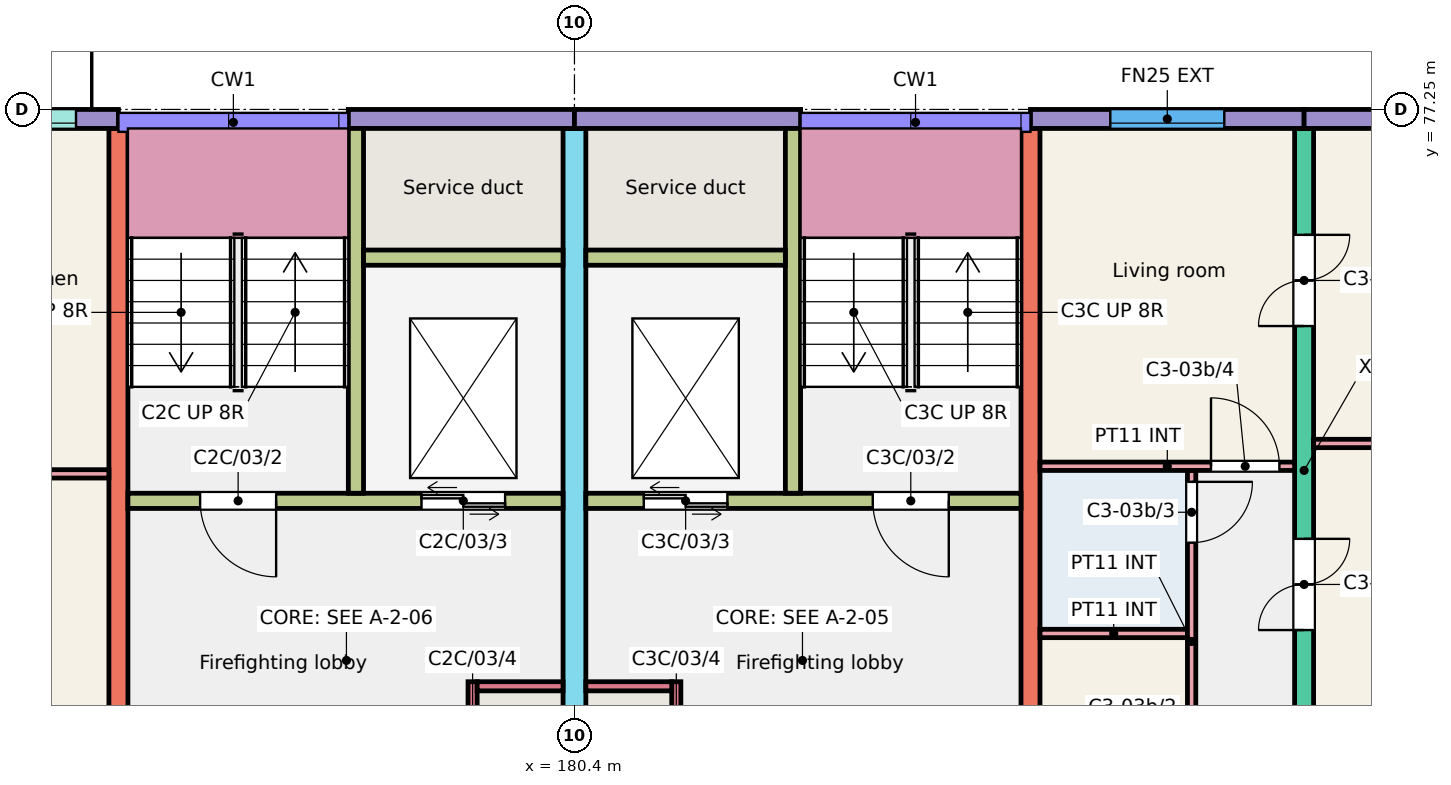
"""IFC4 building model, lengths in metres.
Left out: names, types, materials, properties, quantities, classifications, styles, units other than length and angle.
Written with IfcOpenShell. Run it as: python <this file> out.ifc"""

import sys

from ifc_helpers import new_model, si_unit, direction, frame, frame_2d, origin, place, context, subcontext, project, spatial, rectangle, extrude, element, fill, save


model = new_model("IFC4")
c1 = context("Model", 3, precision=1e-05, world=origin(), true_north=direction((0.0, 1.0)))
c2 = subcontext(c1, "Body", "Model", "MODEL_VIEW")
j1 = project(units=[si_unit("LENGTHUNIT", "METRE"), si_unit("PLANEANGLEUNIT", "RADIAN")], contexts=[c1])
p1 = place(None, origin())
s1 = spatial("IfcSite", under=j1, at=p1, CompositionType="ELEMENT")
p2 = place(p1, origin())
s2 = spatial("IfcBuilding", under=s1, at=p2, CompositionType="ELEMENT")
p3 = place(p2, frame((0.0, 0.0, 9.0)))
s3 = spatial("IfcBuildingStorey", under=s2, at=p3, CompositionType="ELEMENT", Elevation=9.0)
p4 = place(p3, frame((174.4, 68.0, 0.0), z_axis=(0.0, 0.0, 1.0), x_axis=(0.0, 1.0, 0.0)))
e1 = element("IfcWall", 1, at=p4, inside=s3, PredefinedType="SHEAR", context=c2, shape_type="SweptSolid", body=[
    extrude(rectangle(XDim=9.0, YDim=0.25, at=frame_2d((4.5, 0.0))), origin(), (0.0, 0.0, 1.0), 3.0),
])
p5 = place(p3, frame((180.4, 66.0, 0.0), z_axis=(0.0, 0.0, 1.0), x_axis=(0.0, 1.0, 0.0)))
e2 = element("IfcWall", 2, at=p5, inside=s3, PredefinedType="SHEAR", context=c2, shape_type="SweptSolid", body=[
    extrude(rectangle(XDim=11.0, YDim=0.3, at=frame_2d((5.5, 0.0))), origin(), (0.0, 0.0, 1.0), 3.0),
])
p6 = place(p5, frame((0.3, 0.0, 0.0)))
e3 = element("IfcOpeningElement", 3, at=p6, cuts=e2, PredefinedType="OPENING", context=c2, shape_type="SweptSolid", body=[
    extrude(rectangle(XDim=1.2, YDim=2.1, at=frame_2d((0.6, 1.05))), frame((0.0, 0.16, 0.0), z_axis=(0.0, -1.0, 0.0), x_axis=(1.0, 0.0, 0.0)), (0.0, 0.0, 1.0), 0.32),
])
p7 = place(p3, frame((186.4, 68.0, 0.0), z_axis=(0.0, 0.0, 1.0), x_axis=(0.0, 1.0, 0.0)))
e4 = element("IfcWall", 4, at=p7, inside=s3, PredefinedType="SHEAR", context=c2, shape_type="SweptSolid", body=[
    extrude(rectangle(XDim=9.0, YDim=0.25, at=frame_2d((4.5, 0.0))), origin(), (0.0, 0.0, 1.0), 3.0),
])
p8 = place(p3, frame((190.0, 68.0, 0.0), z_axis=(0.0, 0.0, 1.0), x_axis=(0.0, 1.0, 0.0)))
e5 = element("IfcWall", 5, at=p8, inside=s3, PredefinedType="SHEAR", context=c2, shape_type="SweptSolid", body=[
    extrude(rectangle(XDim=9.0, YDim=0.25, at=frame_2d((4.5, 0.0))), origin(), (0.0, 0.0, 1.0), 3.0),
])
p9 = place(p8, frame((2.4, 0.0, 0.0)))
e6 = element("IfcOpeningElement", 6, at=p9, cuts=e5, PredefinedType="OPENING", context=c2, shape_type="SweptSolid", body=[
    extrude(rectangle(XDim=1.2, YDim=2.1, at=frame_2d((0.6, 1.05))), frame((0.0, 0.135, 0.0), z_axis=(0.0, -1.0, 0.0), x_axis=(1.0, 0.0, 0.0)), (0.0, 0.0, 1.0), 0.27),
])
p10 = place(p8, frame((6.4, 0.0, 0.0)))
e7 = element("IfcOpeningElement", 7, at=p10, cuts=e5, PredefinedType="OPENING", context=c2, shape_type="SweptSolid", body=[
    extrude(rectangle(XDim=1.2, YDim=2.1, at=frame_2d((0.6, 1.05))), frame((0.0, 0.135, 0.0), z_axis=(0.0, -1.0, 0.0), x_axis=(1.0, 0.0, 0.0)), (0.0, 0.0, 1.0), 0.27),
])
p11 = place(p3, frame((170.8, 77.125, 0.0), z_axis=(0.0, 0.0, 1.0), x_axis=(1.0, 0.0, 0.0)))
e8 = element("IfcWall", 8, at=p11, inside=s3, PredefinedType="SOLIDWALL", context=c2, shape_type="SweptSolid", body=[
    extrude(rectangle(XDim=3.6, YDim=0.25, at=frame_2d((1.8, 0.0))), origin(), (0.0, 0.0, 1.0), 3.0),
])
p12 = place(p11, frame((1.842, 0.0, 1.1)))
e9 = element("IfcOpeningElement", 9, at=p12, cuts=e8, PredefinedType="OPENING", context=c2, shape_type="SweptSolid", body=[
    extrude(rectangle(XDim=1.2, YDim=1.3, at=frame_2d((0.6, 0.65))), frame((0.0, 0.135, 0.0), z_axis=(0.0, -1.0, 0.0), x_axis=(1.0, 0.0, 0.0)), (0.0, 0.0, 1.0), 0.27),
])
p13 = place(p11, frame((0.309, 0.0, 0.0)))
e10 = element("IfcOpeningElement", 10, at=p13, cuts=e8, PredefinedType="OPENING", context=c2, shape_type="SweptSolid", body=[
    extrude(rectangle(XDim=1.0, YDim=2.1, at=frame_2d((0.5, 1.05))), frame((0.0, 0.135, 0.0), z_axis=(0.0, -1.0, 0.0), x_axis=(1.0, 0.0, 0.0)), (0.0, 0.0, 1.0), 0.27),
])
p14 = place(p3, frame((177.425, 77.125, 0.0), z_axis=(0.0, 0.0, 1.0), x_axis=(1.0, 0.0, 0.0)))
e11 = element("IfcWall", 11, at=p14, inside=s3, PredefinedType="SOLIDWALL", context=c2, shape_type="SweptSolid", body=[
    extrude(rectangle(XDim=2.975, YDim=0.25, at=frame_2d((1.487, 0.0))), origin(), (0.0, 0.0, 1.0), 3.0),
])
p15 = place(p3, frame((174.525, 72.1, 0.0), z_axis=(0.0, 0.0, 1.0), x_axis=(1.0, 0.0, 0.0)))
e12 = element("IfcWall", 12, at=p15, inside=s3, PredefinedType="SHEAR", context=c2, shape_type="SweptSolid", body=[
    extrude(rectangle(XDim=5.725, YDim=0.2, at=frame_2d((2.863, 0.0))), origin(), (0.0, 0.0, 1.0), 3.0),
])
p16 = place(p15, frame((0.95, 0.0, 0.0)))
e13 = element("IfcOpeningElement", 13, at=p16, cuts=e12, PredefinedType="OPENING", context=c2, shape_type="SweptSolid", body=[
    extrude(rectangle(XDim=1.0, YDim=2.1, at=frame_2d((0.5, 1.05))), frame((0.0, 0.11, 0.0), z_axis=(0.0, -1.0, 0.0), x_axis=(1.0, 0.0, 0.0)), (0.0, 0.0, 1.0), 0.22),
])
p17 = place(p15, frame((3.863, 0.0, 0.0)))
e14 = element("IfcOpeningElement", 14, at=p17, cuts=e12, PredefinedType="OPENING", context=c2, shape_type="SweptSolid", body=[
    extrude(rectangle(XDim=1.1, YDim=2.1, at=frame_2d((0.55, 1.05))), frame((0.0, 0.11, 0.0), z_axis=(0.0, -1.0, 0.0), x_axis=(1.0, 0.0, 0.0)), (0.0, 0.0, 1.0), 0.22),
])
p18 = place(p3, frame((177.525, 72.2, 0.0), z_axis=(0.0, 0.0, 1.0), x_axis=(0.0, 1.0, 0.0)))
e15 = element("IfcWall", 15, at=p18, inside=s3, PredefinedType="SHEAR", context=c2, shape_type="SweptSolid", body=[
    extrude(rectangle(XDim=4.8, YDim=0.2, at=frame_2d((2.4, 0.0))), origin(), (0.0, 0.0, 1.0), 3.0),
])
p19 = place(p3, frame((177.625, 75.3, 0.0), z_axis=(0.0, 0.0, 1.0), x_axis=(1.0, 0.0, 0.0)))
e16 = element("IfcWall", 16, at=p19, inside=s3, PredefinedType="SHEAR", context=c2, shape_type="SweptSolid", body=[
    extrude(rectangle(XDim=2.625, YDim=0.2, at=frame_2d((1.312, 0.0))), origin(), (0.0, 0.0, 1.0), 3.0),
])
p20 = place(p3, frame((179.06, 68.0, 0.0), z_axis=(0.0, 0.0, 1.0), x_axis=(0.0, 1.0, 0.0)))
e17 = element("IfcWall", 17, at=p20, inside=s3, PredefinedType="SHEAR", context=c2, shape_type="SweptSolid", body=[
    extrude(rectangle(XDim=1.72, YDim=0.12, at=frame_2d((0.86, 0.0))), origin(), (0.0, 0.0, 1.0), 3.0),
])
p21 = place(p20, frame((0.45, 0.0, 0.0)))
e18 = element("IfcOpeningElement", 18, at=p21, cuts=e17, PredefinedType="OPENING", context=c2, shape_type="SweptSolid", body=[
    extrude(rectangle(XDim=0.9, YDim=2.1, at=frame_2d((0.45, 1.05))), frame((0.0, 0.07, 0.0), z_axis=(0.0, -1.0, 0.0), x_axis=(1.0, 0.0, 0.0)), (0.0, 0.0, 1.0), 0.14),
])
p22 = place(p3, frame((179.12, 69.66, 0.0), z_axis=(0.0, 0.0, 1.0), x_axis=(1.0, 0.0, 0.0)))
e19 = element("IfcWall", 19, at=p22, inside=s3, PredefinedType="SHEAR", context=c2, shape_type="SweptSolid", body=[
    extrude(rectangle(XDim=1.13, YDim=0.12, at=frame_2d((0.565, 0.0))), origin(), (0.0, 0.0, 1.0), 3.0),
])
p23 = place(p3, frame((180.4, 77.125, 0.0), z_axis=(0.0, 0.0, 1.0), x_axis=(1.0, 0.0, 0.0)))
e20 = element("IfcWall", 20, at=p23, inside=s3, PredefinedType="SOLIDWALL", context=c2, shape_type="SweptSolid", body=[
    extrude(rectangle(XDim=2.975, YDim=0.25, at=frame_2d((1.488, 0.0))), origin(), (0.0, 0.0, 1.0), 3.0),
])
p24 = place(p3, frame((180.55, 72.1, 0.0), z_axis=(0.0, 0.0, 1.0), x_axis=(1.0, 0.0, 0.0)))
e21 = element("IfcWall", 21, at=p24, inside=s3, PredefinedType="SHEAR", context=c2, shape_type="SweptSolid", body=[
    extrude(rectangle(XDim=5.725, YDim=0.2, at=frame_2d((2.862, 0.0))), origin(), (0.0, 0.0, 1.0), 3.0),
])
p25 = place(p24, frame((3.775, 0.0, 0.0)))
e22 = element("IfcOpeningElement", 22, at=p25, cuts=e21, PredefinedType="OPENING", context=c2, shape_type="SweptSolid", body=[
    extrude(rectangle(XDim=1.0, YDim=2.1, at=frame_2d((0.5, 1.05))), frame((0.0, 0.11, 0.0), z_axis=(0.0, -1.0, 0.0), x_axis=(1.0, 0.0, 0.0)), (0.0, 0.0, 1.0), 0.22),
])
p26 = place(p24, frame((0.762, 0.0, 0.0)))
e23 = element("IfcOpeningElement", 23, at=p26, cuts=e21, PredefinedType="OPENING", context=c2, shape_type="SweptSolid", body=[
    extrude(rectangle(XDim=1.1, YDim=2.1, at=frame_2d((0.55, 1.05))), frame((0.0, 0.11, 0.0), z_axis=(0.0, -1.0, 0.0), x_axis=(1.0, 0.0, 0.0)), (0.0, 0.0, 1.0), 0.22),
])
p27 = place(p3, frame((183.275, 72.2, 0.0), z_axis=(0.0, 0.0, 1.0), x_axis=(0.0, 1.0, 0.0)))
e24 = element("IfcWall", 24, at=p27, inside=s3, PredefinedType="SHEAR", context=c2, shape_type="SweptSolid", body=[
    extrude(rectangle(XDim=4.8, YDim=0.2, at=frame_2d((2.4, 0.0))), origin(), (0.0, 0.0, 1.0), 3.0),
])
p28 = place(p3, frame((180.55, 75.3, 0.0), z_axis=(0.0, 0.0, 1.0), x_axis=(1.0, 0.0, 0.0)))
e25 = element("IfcWall", 25, at=p28, inside=s3, PredefinedType="SHEAR", context=c2, shape_type="SweptSolid", body=[
    extrude(rectangle(XDim=2.625, YDim=0.2, at=frame_2d((1.312, 0.0))), origin(), (0.0, 0.0, 1.0), 3.0),
])
p29 = place(p3, frame((181.74, 68.0, 0.0), z_axis=(0.0, 0.0, 1.0), x_axis=(0.0, 1.0, 0.0)))
e26 = element("IfcWall", 26, at=p29, inside=s3, PredefinedType="SHEAR", context=c2, shape_type="SweptSolid", body=[
    extrude(rectangle(XDim=1.72, YDim=0.12, at=frame_2d((0.86, 0.0))), origin(), (0.0, 0.0, 1.0), 3.0),
])
p30 = place(p29, frame((0.45, 0.0, 0.0)))
e27 = element("IfcOpeningElement", 27, at=p30, cuts=e26, PredefinedType="OPENING", context=c2, shape_type="SweptSolid", body=[
    extrude(rectangle(XDim=0.9, YDim=2.1, at=frame_2d((0.45, 1.05))), frame((0.0, 0.07, 0.0), z_axis=(0.0, -1.0, 0.0), x_axis=(1.0, 0.0, 0.0)), (0.0, 0.0, 1.0), 0.14),
])
p31 = place(p3, frame((180.55, 69.66, 0.0), z_axis=(0.0, 0.0, 1.0), x_axis=(1.0, 0.0, 0.0)))
e28 = element("IfcWall", 28, at=p31, inside=s3, PredefinedType="SHEAR", context=c2, shape_type="SweptSolid", body=[
    extrude(rectangle(XDim=1.13, YDim=0.12, at=frame_2d((0.565, 0.0))), origin(), (0.0, 0.0, 1.0), 3.0),
])
p32 = place(p3, frame((186.4, 77.125, 0.0), z_axis=(0.0, 0.0, 1.0), x_axis=(1.0, 0.0, 0.0)))
e29 = element("IfcWall", 29, at=p32, inside=s3, PredefinedType="SOLIDWALL", context=c2, shape_type="SweptSolid", body=[
    extrude(rectangle(XDim=3.6, YDim=0.25, at=frame_2d((1.8, 0.0))), origin(), (0.0, 0.0, 1.0), 3.0),
])
p33 = place(p32, frame((1.05, 0.0, 0.9)))
e30 = element("IfcOpeningElement", 30, at=p33, cuts=e29, PredefinedType="OPENING", context=c2, shape_type="SweptSolid", body=[
    extrude(rectangle(XDim=1.5, YDim=1.5, at=frame_2d((0.75, 0.75))), frame((0.0, 0.135, 0.0), z_axis=(0.0, -1.0, 0.0), x_axis=(1.0, 0.0, 0.0)), (0.0, 0.0, 1.0), 0.27),
])
p34 = place(p3, frame((190.0, 77.125, 0.0), z_axis=(0.0, 0.0, 1.0), x_axis=(1.0, 0.0, 0.0)))
e31 = element("IfcWall", 31, at=p34, inside=s3, PredefinedType="SOLIDWALL", context=c2, shape_type="SweptSolid", body=[
    extrude(rectangle(XDim=3.6, YDim=0.25, at=frame_2d((1.8, 0.0))), origin(), (0.0, 0.0, 1.0), 3.0),
])
p35 = place(p34, frame((1.062, 0.0, 0.9)))
e32 = element("IfcOpeningElement", 32, at=p35, cuts=e31, PredefinedType="OPENING", context=c2, shape_type="SweptSolid", body=[
    extrude(rectangle(XDim=1.5, YDim=1.5, at=frame_2d((0.75, 0.75))), frame((0.0, 0.135, 0.0), z_axis=(0.0, -1.0, 0.0), x_axis=(1.0, 0.0, 0.0)), (0.0, 0.0, 1.0), 0.27),
])
p36 = place(p3, frame((170.9, 72.455, 0.0), z_axis=(0.0, 0.0, 1.0), x_axis=(1.0, 0.0, 0.0)))
e33 = element("IfcWall", 33, at=p36, inside=s3, PredefinedType="PARTITIONING", context=c2, shape_type="SweptSolid", body=[
    extrude(rectangle(XDim=3.375, YDim=0.11, at=frame_2d((1.688, 0.0))), origin(), (0.0, 0.0, 1.0), 2.8),
])
p37 = place(p3, frame((186.525, 70.355, 0.0), z_axis=(0.0, 0.0, 1.0), x_axis=(1.0, 0.0, 0.0)))
e34 = element("IfcWall", 34, at=p37, inside=s3, PredefinedType="PARTITIONING", context=c2, shape_type="SweptSolid", body=[
    extrude(rectangle(XDim=1.94, YDim=0.11, at=frame_2d((0.97, 0.0))), origin(), (0.0, 0.0, 1.0), 2.8),
])
p38 = place(p3, frame((188.52, 68.0, 0.0), z_axis=(0.0, 0.0, 1.0), x_axis=(0.0, 1.0, 0.0)))
e35 = element("IfcWall", 35, at=p38, inside=s3, PredefinedType="PARTITIONING", context=c2, shape_type="SweptSolid", body=[
    extrude(rectangle(XDim=4.5, YDim=0.11, at=frame_2d((2.25, 0.0))), origin(), (0.0, 0.0, 1.0), 2.8),
])
p39 = place(p38, frame((0.2, 0.0, 0.0)))
e36 = element("IfcOpeningElement", 36, at=p39, cuts=e35, PredefinedType="OPENING", context=c2, shape_type="SweptSolid", body=[
    extrude(rectangle(XDim=0.8, YDim=2.1, at=frame_2d((0.4, 1.05))), frame((0.0, 0.065, 0.0), z_axis=(0.0, -1.0, 0.0), x_axis=(1.0, 0.0, 0.0)), (0.0, 0.0, 1.0), 0.13),
])
p40 = place(p38, frame((3.55, 0.0, 0.0)))
e37 = element("IfcOpeningElement", 37, at=p40, cuts=e35, PredefinedType="OPENING", context=c2, shape_type="SweptSolid", body=[
    extrude(rectangle(XDim=0.8, YDim=2.1, at=frame_2d((0.4, 1.05))), frame((0.0, 0.065, 0.0), z_axis=(0.0, -1.0, 0.0), x_axis=(1.0, 0.0, 0.0)), (0.0, 0.0, 1.0), 0.13),
])
p41 = place(p3, frame((186.525, 72.555, 0.0), z_axis=(0.0, 0.0, 1.0), x_axis=(1.0, 0.0, 0.0)))
e38 = element("IfcWall", 38, at=p41, inside=s3, PredefinedType="PARTITIONING", context=c2, shape_type="SweptSolid", body=[
    extrude(rectangle(XDim=3.35, YDim=0.11, at=frame_2d((1.675, 0.0))), origin(), (0.0, 0.0, 1.0), 2.8),
])
p42 = place(p41, frame((2.25, 0.0, 0.0)))
e39 = element("IfcOpeningElement", 39, at=p42, cuts=e38, PredefinedType="OPENING", context=c2, shape_type="SweptSolid", body=[
    extrude(rectangle(XDim=0.9, YDim=2.1, at=frame_2d((0.45, 1.05))), frame((0.0, 0.065, 0.0), z_axis=(0.0, -1.0, 0.0), x_axis=(1.0, 0.0, 0.0)), (0.0, 0.0, 1.0), 0.13),
])
p43 = place(p3, frame((190.125, 72.855, 0.0), z_axis=(0.0, 0.0, 1.0), x_axis=(1.0, 0.0, 0.0)))
e40 = element("IfcWall", 40, at=p43, inside=s3, PredefinedType="PARTITIONING", context=c2, shape_type="SweptSolid", body=[
    extrude(rectangle(XDim=3.375, YDim=0.11, at=frame_2d((1.688, 0.0))), origin(), (0.0, 0.0, 1.0), 2.8),
])
p44 = place(p12, origin())
e41 = element("IfcWindow", 41, at=p44, inside=s3, PartitioningType="SINGLE_PANEL", PredefinedType="WINDOW", context=c2, shape_type="SweptSolid", body=[
    extrude(rectangle(XDim=1.2, YDim=1.3, at=frame_2d((0.6, 0.65))), frame((0.0, -0.025, 0.0), z_axis=(0.0, -1.0, 0.0), x_axis=(1.0, 0.0, 0.0)), (0.0, 0.0, 1.0), 0.06),
])
fill(e9, e41)
p45 = place(p33, origin())
e42 = element("IfcWindow", 42, at=p45, inside=s3, PartitioningType="SINGLE_PANEL", PredefinedType="WINDOW", context=c2, shape_type="SweptSolid", body=[
    extrude(rectangle(XDim=1.5, YDim=1.5, at=frame_2d((0.75, 0.75))), frame((0.0, -0.025, 0.0), z_axis=(0.0, -1.0, 0.0), x_axis=(1.0, 0.0, 0.0)), (0.0, 0.0, 1.0), 0.06),
])
fill(e30, e42)
p46 = place(p40, origin())
e43 = element("IfcDoor", 43, at=p46, inside=s3, OperationType="SINGLE_SWING_RIGHT", PredefinedType="DOOR", context=c2, shape_type="SweptSolid", body=[
    extrude(rectangle(XDim=0.8, YDim=2.1, at=frame_2d((0.4, 1.05))), frame((0.0, 0.025, 0.0), z_axis=(0.0, -1.0, 0.0), x_axis=(1.0, 0.0, 0.0)), (0.0, 0.0, 1.0), 0.05),
])
fill(e37, e43)
p47 = place(p42, origin())
e44 = element("IfcDoor", 44, at=p47, inside=s3, OperationType="SINGLE_SWING_LEFT", PredefinedType="DOOR", context=c2, shape_type="SweptSolid", body=[
    extrude(rectangle(XDim=0.9, YDim=2.1, at=frame_2d((0.45, 1.05))), frame((0.0, 0.025, 0.0), z_axis=(0.0, -1.0, 0.0), x_axis=(1.0, 0.0, 0.0)), (0.0, 0.0, 1.0), 0.05),
])
fill(e39, e44)
p48 = place(p9, origin())
e45 = element("IfcDoor", 45, at=p48, inside=s3, OperationType="DOUBLE_DOOR_SINGLE_SWING", PredefinedType="DOOR", context=c2, shape_type="SweptSolid", body=[
    extrude(rectangle(XDim=1.2, YDim=2.1, at=frame_2d((0.6, 1.05))), frame((0.0, 0.025, 0.0), z_axis=(0.0, -1.0, 0.0), x_axis=(1.0, 0.0, 0.0)), (0.0, 0.0, 1.0), 0.05),
])
fill(e6, e45)
p49 = place(p10, origin())
e46 = element("IfcDoor", 46, at=p49, inside=s3, OperationType="DOUBLE_DOOR_SINGLE_SWING", PredefinedType="DOOR", context=c2, shape_type="SweptSolid", body=[
    extrude(rectangle(XDim=1.2, YDim=2.1, at=frame_2d((0.6, 1.05))), frame((0.0, 0.025, 0.0), z_axis=(0.0, -1.0, 0.0), x_axis=(1.0, 0.0, 0.0)), (0.0, 0.0, 1.0), 0.05),
])
fill(e7, e46)
p50 = place(p16, origin())
e47 = element("IfcDoor", 47, at=p50, inside=s3, OperationType="SINGLE_SWING_RIGHT", PredefinedType="DOOR", context=c2, shape_type="SweptSolid", body=[
    extrude(rectangle(XDim=1.0, YDim=2.1, at=frame_2d((0.5, 1.05))), frame((0.0, 0.025, 0.0), z_axis=(0.0, -1.0, 0.0), x_axis=(1.0, 0.0, 0.0)), (0.0, 0.0, 1.0), 0.05),
])
fill(e13, e47)
p51 = place(p17, origin())
e48 = element("IfcDoor", 48, at=p51, inside=s3, OperationType="DOUBLE_DOOR_SLIDING", PredefinedType="DOOR", context=c2, shape_type="SweptSolid", body=[
    extrude(rectangle(XDim=1.1, YDim=2.1, at=frame_2d((0.55, 1.05))), frame((0.0, 0.025, 0.0), z_axis=(0.0, -1.0, 0.0), x_axis=(1.0, 0.0, 0.0)), (0.0, 0.0, 1.0), 0.05),
])
fill(e14, e48)
p52 = place(p25, origin())
e49 = element("IfcDoor", 49, at=p52, inside=s3, OperationType="SINGLE_SWING_RIGHT", PredefinedType="DOOR", context=c2, shape_type="SweptSolid", body=[
    extrude(rectangle(XDim=1.0, YDim=2.1, at=frame_2d((0.5, 1.05))), frame((0.0, 0.025, 0.0), z_axis=(0.0, -1.0, 0.0), x_axis=(1.0, 0.0, 0.0)), (0.0, 0.0, 1.0), 0.05),
])
fill(e22, e49)
p53 = place(p26, origin())
e50 = element("IfcDoor", 50, at=p53, inside=s3, OperationType="DOUBLE_DOOR_SLIDING", PredefinedType="DOOR", context=c2, shape_type="SweptSolid", body=[
    extrude(rectangle(XDim=1.1, YDim=2.1, at=frame_2d((0.55, 1.05))), frame((0.0, 0.025, 0.0), z_axis=(0.0, -1.0, 0.0), x_axis=(1.0, 0.0, 0.0)), (0.0, 0.0, 1.0), 0.05),
])
fill(e23, e50)
save(model, sys.argv[1])
